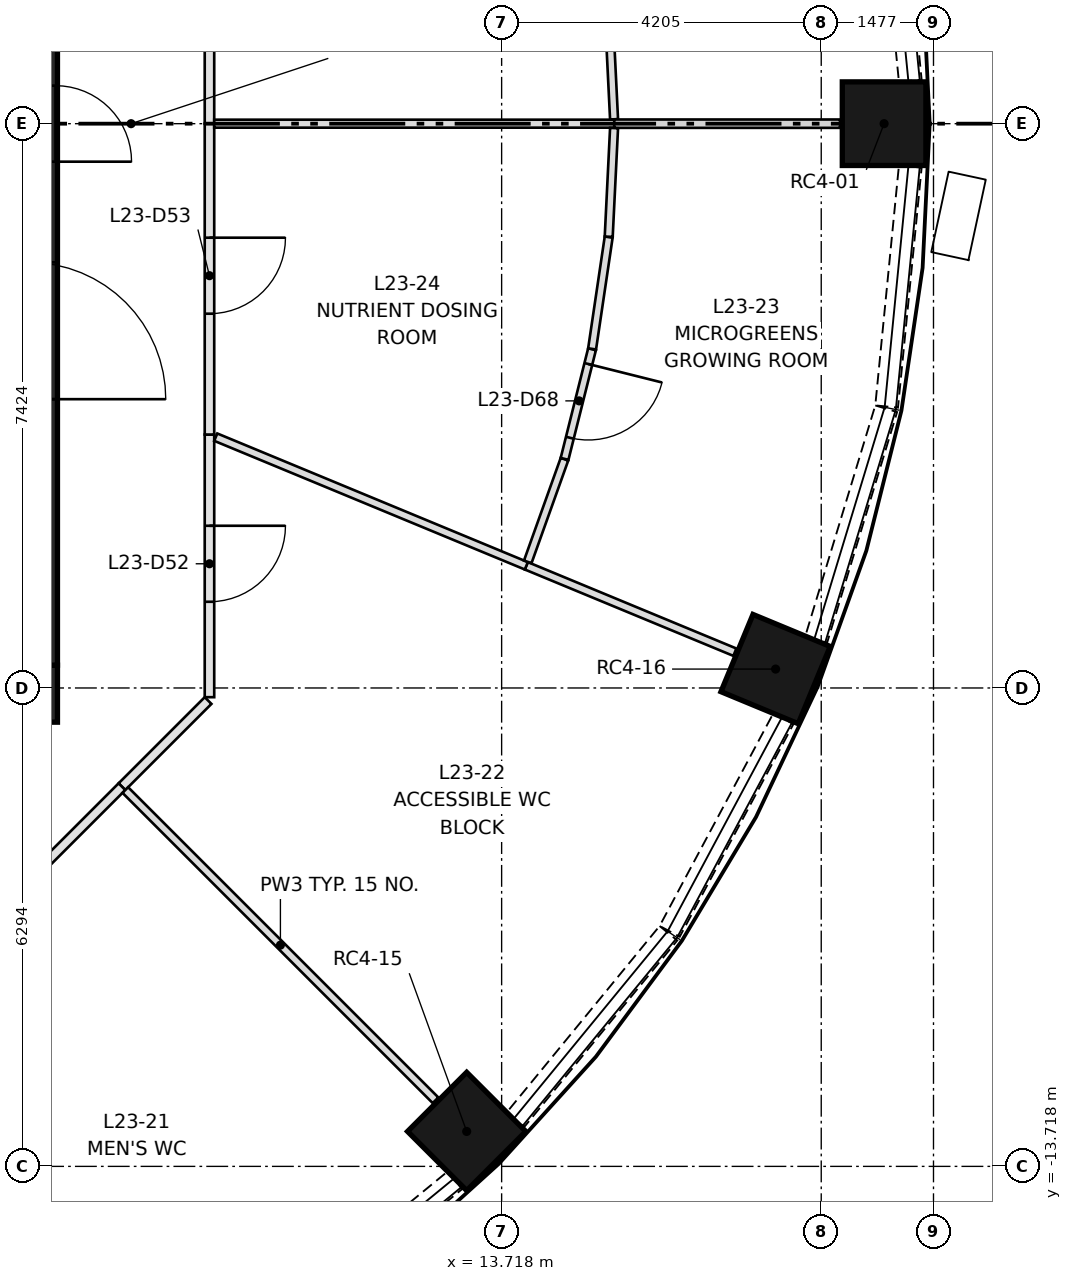
"""IFC4 building model, lengths in metres.
Left out: names, types, materials, properties, quantities, classifications, styles, units other than length and angle.
Written with IfcOpenShell. Run it as: python <this file> out.ifc"""

import sys

from ifc_helpers import new_model, si_unit, direction, frame, frame_2d, origin, origin_2d, place, context, subcontext, project, spatial, rectangle, extrude, element, fill, save


model = new_model("IFC4")
c1 = context("Model", 3, precision=1e-05, world=origin(), true_north=direction((0.0, 1.0)))
c2 = subcontext(c1, "Body", "Model", "MODEL_VIEW")
j1 = project(units=[si_unit("LENGTHUNIT", "METRE"), si_unit("PLANEANGLEUNIT", "RADIAN")], contexts=[c1])
p1 = place(None, origin())
s1 = spatial("IfcSite", under=j1, at=p1, CompositionType="ELEMENT")
p2 = place(p1, origin())
s2 = spatial("IfcBuilding", under=s1, at=p2, CompositionType="ELEMENT")
p3 = place(p2, frame((0.0, 0.0, 91.0)))
s3 = spatial("IfcBuildingStorey", under=s2, at=p3, CompositionType="ELEMENT", Elevation=91.0)
for number, where, z_axis, x_axis in (
    (1, (18.75, 0.0, 0.0), (0.0, 0.0, 1.0), (1.0, 0.0, 0.0)),
    (2, (13.258, -13.258, 0.0), (0.0, 0.0, 1.0), (0.707, -0.707, 0.0)),
    (3, (17.323, -7.175, 0.0), (0.0, 0.0, 1.0), (0.924, -0.383, 0.0)),
):
    element("IfcColumn", number, at=place(p3, frame(where, z_axis=z_axis, x_axis=x_axis)), inside=s3, PredefinedType="COLUMN", context=c2, shape_type="SweptSolid", body=[
        extrude(rectangle(XDim=1.1, YDim=1.1, at=origin_2d()), origin(), (0.0, 0.0, 1.0), 3.65),
    ])
p4 = place(p3, frame((-7.874, -7.499, 0.0), z_axis=(0.0, 0.0, 1.0), x_axis=(1.0, 0.0, 0.0)))
e4 = element("IfcWall", 4, at=p4, inside=s3, PredefinedType="SHEAR", context=c2, shape_type="SweptSolid", body=[
    extrude(rectangle(XDim=15.748, YDim=0.75, at=frame_2d((7.874, 0.0))), origin(), (0.0, 0.0, 1.0), 3.65),
])
p5 = place(p3, frame((7.499, -7.124, 0.0), z_axis=(0.0, 0.0, 1.0), x_axis=(0.0, 1.0, 0.0)))
e5 = element("IfcWall", 5, at=p5, inside=s3, PredefinedType="SHEAR", context=c2, shape_type="SweptSolid", body=[
    extrude(rectangle(XDim=14.248, YDim=0.75, at=frame_2d((7.124, 0.0))), origin(), (0.0, 0.0, 1.0), 3.65),
])
p6 = place(p5, frame((6.624, 0.0, 0.0)))
e6 = element("IfcOpeningElement", 6, at=p6, cuts=e5, PredefinedType="OPENING", context=c2, shape_type="SweptSolid", body=[
    extrude(rectangle(XDim=1.0, YDim=2.1, at=frame_2d((0.5, 1.05))), frame((0.0, 0.385, 0.0), z_axis=(0.0, -1.0, 0.0), x_axis=(1.0, 0.0, 0.0)), (0.0, 0.0, 1.0), 0.77),
])
p7 = place(p5, frame((3.5, 0.0, 0.0)))
e7 = element("IfcOpeningElement", 7, at=p7, cuts=e5, PredefinedType="OPENING", context=c2, shape_type="SweptSolid", body=[
    extrude(rectangle(XDim=1.8, YDim=2.1, at=frame_2d((0.9, 1.05))), frame((0.0, 0.385, 0.0), z_axis=(0.0, -1.0, 0.0), x_axis=(1.0, 0.0, 0.0)), (0.0, 0.0, 1.0), 0.77),
])
p8 = place(p5, frame((8.948, 0.0, 0.0)))
e8 = element("IfcOpeningElement", 8, at=p8, cuts=e5, PredefinedType="OPENING", context=c2, shape_type="SweptSolid", body=[
    extrude(rectangle(XDim=1.8, YDim=2.1, at=frame_2d((0.9, 1.05))), frame((0.0, 0.385, 0.0), z_axis=(0.0, -1.0, 0.0), x_axis=(1.0, 0.0, 0.0)), (0.0, 0.0, 1.0), 0.77),
])
for number, where, z_axis, x_axis in (
    (9, (19.094, 0.564, 0.0), (0.0, 0.0, 1.0), (-0.098, 0.995, 0.0)),
    (10, (10.651, -15.913, 0.0), (0.0, 0.0, 1.0), (0.773, 0.634, 0.0)),
    (11, (13.9, -13.104, 0.0), (0.0, 0.0, 1.0), (0.634, 0.773, 0.0)),
):
    element("IfcWall", number, at=place(p3, frame(where, z_axis=z_axis, x_axis=x_axis)), inside=s3, PredefinedType="SOLIDWALL", context=c2, shape_type="SweptSolid", body=[
        extrude(rectangle(XDim=3.173, YDim=0.3, at=frame_2d((1.586, 0.0))), origin(), (0.0, 0.0, 1.0), 0.9),
    ])
p9 = place(p3, frame((15.929, -10.626, 0.0), z_axis=(0.0, 0.0, 1.0), x_axis=(0.471458802606, 0.88188808669, 0.0)))
e12 = element("IfcWall", 12, at=p9, inside=s3, PredefinedType="SOLIDWALL", context=c2, shape_type="SweptSolid", body=[
    extrude(rectangle(XDim=3.172, YDim=0.3, at=frame_2d((1.586, 0.0))), origin(), (0.0, 0.0, 1.0), 0.9),
])
p10 = place(p3, frame((17.856, -6.787, 0.0), z_axis=(0.0, 0.0, 1.0), x_axis=(0.290325591482, 0.956927923582, 0.0)))
e13 = element("IfcWall", 13, at=p10, inside=s3, PredefinedType="SOLIDWALL", context=c2, shape_type="SweptSolid", body=[
    extrude(rectangle(XDim=3.173, YDim=0.3, at=frame_2d((1.586, 0.0))), origin(), (0.0, 0.0, 1.0), 0.9),
])
p11 = place(p3, frame((18.783, -3.721, 0.0), z_axis=(0.0, 0.0, 1.0), x_axis=(0.098040704044, 0.995182405567, 0.0)))
e14 = element("IfcWall", 14, at=p11, inside=s3, PredefinedType="SOLIDWALL", context=c2, shape_type="SweptSolid", body=[
    extrude(rectangle(XDim=3.173, YDim=0.3, at=frame_2d((1.586, 0.0))), origin(), (0.0, 0.0, 1.0), 0.9),
])
p12 = place(p3, frame((9.874, 4.09, 0.0), z_axis=(0.0, 0.0, 1.0), x_axis=(0.0, -1.0, 0.0)))
e15 = element("IfcWall", 15, at=p12, inside=s3, PredefinedType="PARTITIONING", context=c2, shape_type="SweptSolid", body=[
    extrude(rectangle(XDim=4.09, YDim=0.125, at=frame_2d((2.045, 0.0))), origin(), (0.0, 0.0, 1.0), 3.3),
])
p13 = place(p12, frame((1.5, 0.0, 0.0)))
e16 = element("IfcOpeningElement", 16, at=p13, cuts=e15, PredefinedType="OPENING", context=c2, shape_type="SweptSolid", body=[
    extrude(rectangle(XDim=1.0, YDim=2.1, at=frame_2d((0.5, 1.05))), frame((0.0, 0.073, 0.0), z_axis=(0.0, -1.0, 0.0), x_axis=(1.0, 0.0, 0.0)), (0.0, 0.0, 1.0), 0.145),
])
p14 = place(p3, frame((9.856, -7.589, 0.0), z_axis=(0.0, 0.0, 1.0), x_axis=(-0.70718294931, -0.707030604857, 0.0)))
e17 = element("IfcWall", 17, at=p14, inside=s3, PredefinedType="PARTITIONING", context=c2, shape_type="SweptSolid", body=[
    extrude(rectangle(XDim=1.603, YDim=0.125, at=frame_2d((0.801, 0.0))), origin(), (0.0, 0.0, 1.0), 3.3),
])
p15 = place(p3, frame((9.874, -4.09, 0.0), z_axis=(0.0, 0.0, 1.0), x_axis=(0.0, -1.0, 0.0)))
e18 = element("IfcWall", 18, at=p15, inside=s3, PredefinedType="PARTITIONING", context=c2, shape_type="SweptSolid", body=[
    extrude(rectangle(XDim=3.455, YDim=0.125, at=frame_2d((1.728, 0.0))), origin(), (0.0, 0.0, 1.0), 3.3),
])
p16 = place(p15, frame((1.2, 0.0, 0.0)))
e19 = element("IfcOpeningElement", 19, at=p16, cuts=e18, PredefinedType="OPENING", context=c2, shape_type="SweptSolid", body=[
    extrude(rectangle(XDim=1.0, YDim=2.1, at=frame_2d((0.5, 1.05))), frame((0.0, 0.073, 0.0), z_axis=(0.0, -1.0, 0.0), x_axis=(1.0, 0.0, 0.0)), (0.0, 0.0, 1.0), 0.145),
])
p17 = place(p3, frame((9.874, 0.0, 0.0), z_axis=(0.0, 0.0, 1.0), x_axis=(0.0, -1.0, 0.0)))
e20 = element("IfcWall", 20, at=p17, inside=s3, PredefinedType="PARTITIONING", context=c2, shape_type="SweptSolid", body=[
    extrude(rectangle(XDim=4.09, YDim=0.125, at=frame_2d((2.045, 0.0))), origin(), (0.0, 0.0, 1.0), 3.3),
])
p18 = place(p17, frame((1.5, 0.0, 0.0)))
e21 = element("IfcOpeningElement", 21, at=p18, cuts=e20, PredefinedType="OPENING", context=c2, shape_type="SweptSolid", body=[
    extrude(rectangle(XDim=1.0, YDim=2.1, at=frame_2d((0.5, 1.05))), frame((0.0, 0.073, 0.0), z_axis=(0.0, -1.0, 0.0), x_axis=(1.0, 0.0, 0.0)), (0.0, 0.0, 1.0), 0.145),
])
p19 = place(p3, frame((8.722, -8.722, 0.0), z_axis=(0.0, 0.0, 1.0), x_axis=(-0.707030604857, -0.70718294931, 0.0)))
e22 = element("IfcWall", 22, at=p19, inside=s3, PredefinedType="PARTITIONING", context=c2, shape_type="SweptSolid", body=[
    extrude(rectangle(XDim=1.603, YDim=0.125, at=frame_2d((0.801, 0.0))), origin(), (0.0, 0.0, 1.0), 3.3),
])
p20 = place(p3, frame((15.127, 1.487, 0.0), z_axis=(0.0, 0.0, 1.0), x_axis=(0.0491209592, -0.998792837062, 0.0)))
e23 = element("IfcWall", 23, at=p20, inside=s3, PredefinedType="PARTITIONING", context=c2, shape_type="SweptSolid", body=[
    extrude(rectangle(XDim=1.431, YDim=0.105, at=frame_2d((0.716, 0.0))), origin(), (0.0, 0.0, 1.0), 3.3),
])
p21 = place(p3, frame((15.2, 0.0, 0.0), z_axis=(0.0, 0.0, 1.0), x_axis=(-1.0, 0.0, 0.0)))
e24 = element("IfcWall", 24, at=p21, inside=s3, PredefinedType="PARTITIONING", context=c2, shape_type="SweptSolid", body=[
    extrude(rectangle(XDim=5.263, YDim=0.105, at=frame_2d((2.632, 0.0))), origin(), (0.0, 0.0, 1.0), 3.3),
])
p22 = place(p3, frame((18.17, 0.0, 0.0), z_axis=(0.0, 0.0, 1.0), x_axis=(-1.0, 0.0, 0.0)))
e25 = element("IfcWall", 25, at=p22, inside=s3, PredefinedType="PARTITIONING", context=c2, shape_type="SweptSolid", body=[
    extrude(rectangle(XDim=2.97, YDim=0.11, at=frame_2d((1.485, 0.0))), origin(), (0.0, 0.0, 1.0), 3.3),
])
p23 = place(p3, frame((8.767, -8.767, 0.0), z_axis=(0.0, 0.0, 1.0), x_axis=(0.707106781187, -0.707106781187, 0.0)))
e26 = element("IfcWall", 26, at=p23, inside=s3, PredefinedType="PARTITIONING", context=c2, shape_type="SweptSolid", body=[
    extrude(rectangle(XDim=5.772, YDim=0.105, at=frame_2d((2.886, 0.0))), origin(), (0.0, 0.0, 1.0), 3.3),
])
p24 = place(p3, frame((14.043, -5.817, 0.0), z_axis=(0.0, 0.0, 1.0), x_axis=(0.923889594764, -0.382659139036, 0.0)))
e27 = element("IfcWall", 27, at=p24, inside=s3, PredefinedType="PARTITIONING", context=c2, shape_type="SweptSolid", body=[
    extrude(rectangle(XDim=2.97, YDim=0.105, at=frame_2d((1.485, 0.0))), origin(), (0.0, 0.0, 1.0), 3.3),
])
p25 = place(p3, frame((9.957, -4.124, 0.0), z_axis=(0.0, 0.0, 1.0), x_axis=(0.923862097388, -0.382725521764, 0.0)))
e28 = element("IfcWall", 28, at=p25, inside=s3, PredefinedType="PARTITIONING", context=c2, shape_type="SweptSolid", body=[
    extrude(rectangle(XDim=4.423, YDim=0.105, at=frame_2d((2.211, 0.0))), origin(), (0.0, 0.0, 1.0), 3.3),
])
p26 = place(p3, frame((14.062, -5.765, 0.0), z_axis=(0.0, 0.0, 1.0), x_axis=(0.336940319535, 0.941526006583, 0.0)))
e29 = element("IfcWall", 29, at=p26, inside=s3, PredefinedType="PARTITIONING", context=c2, shape_type="SweptSolid", body=[
    extrude(rectangle(XDim=1.434, YDim=0.105, at=frame_2d((0.717, 0.0))), origin(), (0.0, 0.0, 1.0), 3.3),
])
p27 = place(p3, frame((14.907, -2.968, 0.0), z_axis=(0.0, 0.0, 1.0), x_axis=(-0.242922070527, -0.970045806986, 0.0)))
e30 = element("IfcWall", 30, at=p27, inside=s3, PredefinedType="PARTITIONING", context=c2, shape_type="SweptSolid", body=[
    extrude(rectangle(XDim=1.486, YDim=0.105, at=frame_2d((0.743, 0.0))), origin(), (0.0, 0.0, 1.0), 3.3),
])
p28 = place(p27, frame((0.2, 0.0, 0.0)))
e31 = element("IfcOpeningElement", 31, at=p28, cuts=e30, PredefinedType="OPENING", context=c2, shape_type="SweptSolid", body=[
    extrude(rectangle(XDim=1.0, YDim=2.1, at=frame_2d((0.5, 1.05))), frame((0.0, 0.062, 0.0), z_axis=(0.0, -1.0, 0.0), x_axis=(1.0, 0.0, 0.0)), (0.0, 0.0, 1.0), 0.125),
])
p29 = place(p3, frame((14.908, -2.963, 0.0), z_axis=(0.0, 0.0, 1.0), x_axis=(0.146822447166, 0.989162862732, 0.0)))
e32 = element("IfcWall", 32, at=p29, inside=s3, PredefinedType="PARTITIONING", context=c2, shape_type="SweptSolid", body=[
    extrude(rectangle(XDim=1.487, YDim=0.105, at=frame_2d((0.743, 0.0))), origin(), (0.0, 0.0, 1.0), 3.3),
])
p30 = place(p3, frame((15.127, -1.487, 0.0), z_axis=(0.0, 0.0, 1.0), x_axis=(0.0491209592, 0.998792837062, 0.0)))
e33 = element("IfcWall", 33, at=p30, inside=s3, PredefinedType="PARTITIONING", context=c2, shape_type="SweptSolid", body=[
    extrude(rectangle(XDim=1.431, YDim=0.105, at=frame_2d((0.716, 0.0))), origin(), (0.0, 0.0, 1.0), 3.3),
])
p31 = place(p6, frame((1.0, 0.0, 0.0), z_axis=(0.0, 0.0, 1.0), x_axis=(-1.0, 0.0, 0.0)))
e34 = element("IfcDoor", 34, at=p31, inside=s3, OperationType="SINGLE_SWING_LEFT", PredefinedType="DOOR", context=c2, shape_type="SweptSolid", body=[
    extrude(rectangle(XDim=1.0, YDim=2.1, at=frame_2d((0.5, 1.05))), frame((0.0, 0.375, 0.0), z_axis=(0.0, -1.0, 0.0), x_axis=(1.0, 0.0, 0.0)), (0.0, 0.0, 1.0), 0.05),
])
fill(e6, e34)
p32 = place(p16, origin())
e35 = element("IfcDoor", 35, at=p32, inside=s3, OperationType="SINGLE_SWING_LEFT", PredefinedType="DOOR", context=c2, shape_type="SweptSolid", body=[
    extrude(rectangle(XDim=1.0, YDim=2.1, at=frame_2d((0.5, 1.05))), frame((0.0, 0.025, 0.0), z_axis=(0.0, -1.0, 0.0), x_axis=(1.0, 0.0, 0.0)), (0.0, 0.0, 1.0), 0.05),
])
fill(e19, e35)
p33 = place(p18, origin())
e36 = element("IfcDoor", 36, at=p33, inside=s3, OperationType="SINGLE_SWING_LEFT", PredefinedType="DOOR", context=c2, shape_type="SweptSolid", body=[
    extrude(rectangle(XDim=1.0, YDim=2.1, at=frame_2d((0.5, 1.05))), frame((0.0, 0.025, 0.0), z_axis=(0.0, -1.0, 0.0), x_axis=(1.0, 0.0, 0.0)), (0.0, 0.0, 1.0), 0.05),
])
fill(e21, e36)
p34 = place(p28, origin())
e37 = element("IfcDoor", 37, at=p34, inside=s3, OperationType="SINGLE_SWING_LEFT", PredefinedType="DOOR", context=c2, shape_type="SweptSolid", body=[
    extrude(rectangle(XDim=1.0, YDim=2.1, at=frame_2d((0.5, 1.05))), frame((0.0, 0.025, 0.0), z_axis=(0.0, -1.0, 0.0), x_axis=(1.0, 0.0, 0.0)), (0.0, 0.0, 1.0), 0.05),
])
fill(e31, e37)
save(model, sys.argv[1])
